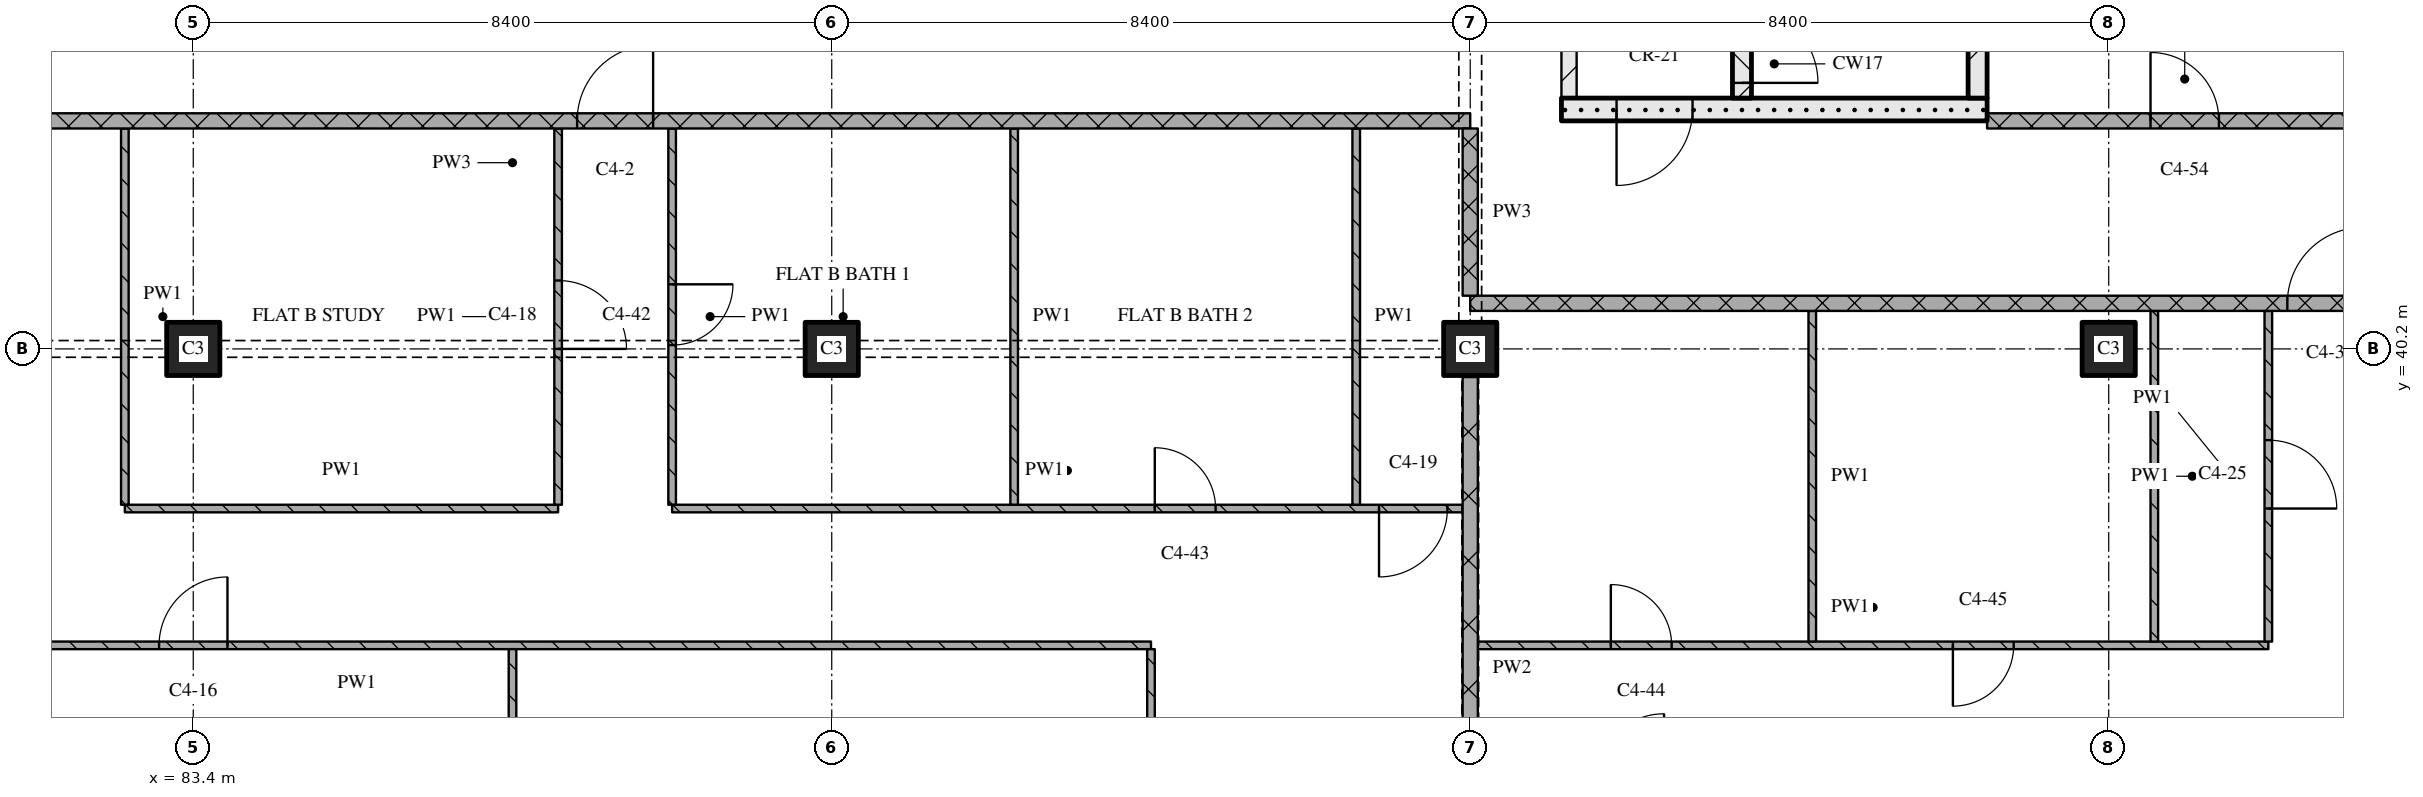
"""IFC4 building model, lengths in metres.
Left out: names, types, materials, properties, quantities, classifications, styles, units other than length and angle.
Written with IfcOpenShell. Run it as: python <this file> out.ifc"""

import sys

from ifc_helpers import new_model, si_unit, direction, frame, frame_2d, origin, origin_2d, place, context, subcontext, project, spatial, rectangle, extrude, element, fill, save


model = new_model("IFC4")
c1 = context("Model", 3, precision=1e-05, world=origin(), true_north=direction((0.0, 1.0)))
c2 = subcontext(c1, "Body", "Model", "MODEL_VIEW")
j1 = project(units=[si_unit("LENGTHUNIT", "METRE"), si_unit("PLANEANGLEUNIT", "RADIAN")], contexts=[c1])
p1 = place(None, origin())
s1 = spatial("IfcSite", under=j1, at=p1, CompositionType="ELEMENT")
p2 = place(p1, origin())
s2 = spatial("IfcBuilding", under=s1, at=p2, CompositionType="ELEMENT")
p3 = place(p2, frame((0.0, 0.0, 179.85)))
s3 = spatial("IfcBuildingStorey", under=s2, at=p3, CompositionType="ELEMENT", Elevation=179.85)
for number, where, z_axis, x_axis in (
    (1, (83.4, 40.2, 0.0), (0.0, 0.0, 1.0), (1.0, 0.0, 0.0)),
    (2, (91.8, 40.2, 0.0), (0.0, 0.0, 1.0), (1.0, 0.0, 0.0)),
    (3, (100.2, 40.2, 0.0), (0.0, 0.0, 1.0), (1.0, 0.0, 0.0)),
    (4, (108.6, 40.2, 0.0), (0.0, 0.0, 1.0), (1.0, 0.0, 0.0)),
):
    element("IfcColumn", number, at=place(p3, frame(where, z_axis=z_axis, x_axis=x_axis)), inside=s3, PredefinedType="COLUMN", context=c2, shape_type="SweptSolid", body=[
        extrude(rectangle(XDim=0.7, YDim=0.7, at=origin_2d()), origin(), (0.0, 0.0, 1.0), 3.6),
    ])
p4 = place(p3, frame((101.4, 43.35, 0.0), z_axis=(0.0, 0.0, 1.0), x_axis=(1.0, 0.0, 0.0)))
e5 = element("IfcWall", 5, at=p4, inside=s3, PredefinedType="SOLIDWALL", context=c2, shape_type="SweptSolid", body=[
    extrude(rectangle(XDim=5.6, YDim=0.3, at=frame_2d((2.8, 0.0))), origin(), (0.0, 0.0, 1.0), 3.32),
])
p5 = place(p4, frame((0.725, 0.0, 0.0)))
e6 = element("IfcOpeningElement", 6, at=p5, cuts=e5, PredefinedType="OPENING", context=c2, shape_type="SweptSolid", body=[
    extrude(rectangle(XDim=1.0, YDim=2.1, at=frame_2d((0.5, 1.05))), frame((0.0, 0.16, 0.0), z_axis=(0.0, -1.0, 0.0), x_axis=(1.0, 0.0, 0.0)), (0.0, 0.0, 1.0), 0.32),
])
p6 = place(p3, frame((101.5, 43.5, 0.0), z_axis=(0.0, 0.0, 1.0), x_axis=(0.0, 1.0, 0.0)))
e7 = element("IfcWall", 7, at=p6, inside=s3, PredefinedType="PARTITIONING", context=c2, shape_type="SweptSolid", body=[
    extrude(rectangle(XDim=6.9, YDim=0.2, at=frame_2d((3.45, 0.0))), origin(), (0.0, 0.0, 1.0), 3.32),
])
p7 = place(p6, frame((1.0, 0.0, 0.0)))
e8 = element("IfcOpeningElement", 8, at=p7, cuts=e7, PredefinedType="OPENING", context=c2, shape_type="SweptSolid", body=[
    extrude(rectangle(XDim=1.0, YDim=2.1, at=frame_2d((0.5, 1.05))), frame((0.0, 0.11, 0.0), z_axis=(0.0, -1.0, 0.0), x_axis=(1.0, 0.0, 0.0)), (0.0, 0.0, 1.0), 0.22),
])
p8 = place(p3, frame((103.775, 43.5, 0.0), z_axis=(0.0, 0.0, 1.0), x_axis=(0.0, 1.0, 0.0)))
e9 = element("IfcWall", 9, at=p8, inside=s3, PredefinedType="SOLIDWALL", context=c2, shape_type="SweptSolid", body=[
    extrude(rectangle(XDim=6.9, YDim=0.25, at=frame_2d((3.45, 0.0))), origin(), (0.0, 0.0, 1.0), 3.32),
])
p9 = place(p8, frame((0.2, 0.0, 0.0)))
e10 = element("IfcOpeningElement", 10, at=p9, cuts=e9, PredefinedType="OPENING", context=c2, shape_type="SweptSolid", body=[
    extrude(rectangle(XDim=1.0, YDim=2.1, at=frame_2d((0.5, 1.05))), frame((0.0, 0.135, 0.0), z_axis=(0.0, -1.0, 0.0), x_axis=(1.0, 0.0, 0.0)), (0.0, 0.0, 1.0), 0.27),
])
p10 = place(p3, frame((106.875, 43.5, 0.0), z_axis=(0.0, 0.0, 1.0), x_axis=(0.0, 1.0, 0.0)))
e11 = element("IfcWall", 11, at=p10, inside=s3, PredefinedType="SOLIDWALL", context=c2, shape_type="SweptSolid", body=[
    extrude(rectangle(XDim=6.9, YDim=0.25, at=frame_2d((3.45, 0.0))), origin(), (0.0, 0.0, 1.0), 3.32),
])
p11 = place(p3, frame((96.0, 36.3, 0.0), z_axis=(0.0, 0.0, 1.0), x_axis=(-1.0, 0.0, 0.0)))
e12 = element("IfcWall", 12, at=p11, inside=s3, PredefinedType="PARTITIONING", context=c2, shape_type="SweptSolid", body=[
    extrude(rectangle(XDim=20.9, YDim=0.1, at=frame_2d((10.45, 0.0))), origin(), (0.0, 0.0, 1.0), 3.32),
])
p12 = place(p11, frame((12.15, 0.0, 0.0)))
e13 = element("IfcOpeningElement", 13, at=p12, cuts=e12, PredefinedType="OPENING", context=c2, shape_type="SweptSolid", body=[
    extrude(rectangle(XDim=0.9, YDim=2.1, at=frame_2d((0.45, 1.05))), frame((0.0, 0.06, 0.0), z_axis=(0.0, -1.0, 0.0), x_axis=(1.0, 0.0, 0.0)), (0.0, 0.0, 1.0), 0.12),
])
p13 = place(p11, frame((18.45, 0.0, 0.0)))
e14 = element("IfcOpeningElement", 14, at=p13, cuts=e12, PredefinedType="OPENING", context=c2, shape_type="SweptSolid", body=[
    extrude(rectangle(XDim=0.9, YDim=2.1, at=frame_2d((0.45, 1.05))), frame((0.0, 0.06, 0.0), z_axis=(0.0, -1.0, 0.0), x_axis=(1.0, 0.0, 0.0)), (0.0, 0.0, 1.0), 0.12),
])
p14 = place(p3, frame((100.3, 36.3, 0.0), z_axis=(0.0, 0.0, 1.0), x_axis=(1.0, 0.0, 0.0)))
e15 = element("IfcWall", 15, at=p14, inside=s3, PredefinedType="PARTITIONING", context=c2, shape_type="SweptSolid", body=[
    extrude(rectangle(XDim=10.4, YDim=0.1, at=frame_2d((5.2, 0.0))), origin(), (0.0, 0.0, 1.0), 3.32),
])
p15 = place(p14, frame((1.75, 0.0, 0.0)))
e16 = element("IfcOpeningElement", 16, at=p15, cuts=e15, PredefinedType="OPENING", context=c2, shape_type="SweptSolid", body=[
    extrude(rectangle(XDim=0.8, YDim=2.1, at=frame_2d((0.4, 1.05))), frame((0.0, 0.06, 0.0), z_axis=(0.0, -1.0, 0.0), x_axis=(1.0, 0.0, 0.0)), (0.0, 0.0, 1.0), 0.12),
])
p16 = place(p14, frame((6.25, 0.0, 0.0)))
e17 = element("IfcOpeningElement", 17, at=p16, cuts=e15, PredefinedType="OPENING", context=c2, shape_type="SweptSolid", body=[
    extrude(rectangle(XDim=0.8, YDim=2.1, at=frame_2d((0.4, 1.05))), frame((0.0, 0.06, 0.0), z_axis=(0.0, -1.0, 0.0), x_axis=(1.0, 0.0, 0.0)), (0.0, 0.0, 1.0), 0.12),
])
p17 = place(p3, frame((82.5, 38.1, 0.0), z_axis=(0.0, 0.0, 1.0), x_axis=(1.0, 0.0, 0.0)))
e18 = element("IfcWall", 18, at=p17, inside=s3, PredefinedType="PARTITIONING", context=c2, shape_type="SweptSolid", body=[
    extrude(rectangle(XDim=5.7, YDim=0.1, at=frame_2d((2.85, 0.0))), origin(), (0.0, 0.0, 1.0), 3.32),
])
p18 = place(p3, frame((89.7, 38.1, 0.0), z_axis=(0.0, 0.0, 1.0), x_axis=(1.0, 0.0, 0.0)))
e19 = element("IfcWall", 19, at=p18, inside=s3, PredefinedType="PARTITIONING", context=c2, shape_type="SweptSolid", body=[
    extrude(rectangle(XDim=10.4, YDim=0.1, at=frame_2d((5.2, 0.0))), origin(), (0.0, 0.0, 1.0), 3.32),
])
p19 = place(p18, frame((6.35, 0.0, 0.0)))
e20 = element("IfcOpeningElement", 20, at=p19, cuts=e19, PredefinedType="OPENING", context=c2, shape_type="SweptSolid", body=[
    extrude(rectangle(XDim=0.8, YDim=2.1, at=frame_2d((0.4, 1.05))), frame((0.0, 0.06, 0.0), z_axis=(0.0, -1.0, 0.0), x_axis=(1.0, 0.0, 0.0)), (0.0, 0.0, 1.0), 0.12),
])
p20 = place(p18, frame((9.3, 0.0, 0.0)))
e21 = element("IfcOpeningElement", 21, at=p20, cuts=e19, PredefinedType="OPENING", context=c2, shape_type="SweptSolid", body=[
    extrude(rectangle(XDim=0.9, YDim=2.1, at=frame_2d((0.45, 1.05))), frame((0.0, 0.06, 0.0), z_axis=(0.0, -1.0, 0.0), x_axis=(1.0, 0.0, 0.0)), (0.0, 0.0, 1.0), 0.12),
])
p21 = place(p3, frame((124.48, 40.8, 0.0), z_axis=(0.0, 0.0, 1.0), x_axis=(-1.0, 0.0, 0.0)))
e22 = element("IfcWall", 22, at=p21, inside=s3, PredefinedType="PARTITIONING", context=c2, shape_type="SweptSolid", body=[
    extrude(rectangle(XDim=24.28, YDim=0.2, at=frame_2d((12.14, 0.0))), origin(), (0.0, 0.0, 1.0), 3.32),
])
p22 = place(p21, frame((12.53, 0.0, 0.0)))
e23 = element("IfcOpeningElement", 23, at=p22, cuts=e22, PredefinedType="OPENING", context=c2, shape_type="SweptSolid", body=[
    extrude(rectangle(XDim=1.0, YDim=2.1, at=frame_2d((0.5, 1.05))), frame((0.0, 0.11, 0.0), z_axis=(0.0, -1.0, 0.0), x_axis=(1.0, 0.0, 0.0)), (0.0, 0.0, 1.0), 0.22),
])
p23 = place(p3, frame((100.2, 43.2, 0.0), z_axis=(0.0, 0.0, 1.0), x_axis=(-1.0, 0.0, 0.0)))
e24 = element("IfcWall", 24, at=p23, inside=s3, PredefinedType="PARTITIONING", context=c2, shape_type="SweptSolid", body=[
    extrude(rectangle(XDim=25.2, YDim=0.2, at=frame_2d((12.6, 0.0))), origin(), (0.0, 0.0, 1.0), 3.32),
])
p24 = place(p23, frame((10.75, 0.0, 0.0)))
e25 = element("IfcOpeningElement", 25, at=p24, cuts=e24, PredefinedType="OPENING", context=c2, shape_type="SweptSolid", body=[
    extrude(rectangle(XDim=1.0, YDim=2.1, at=frame_2d((0.5, 1.05))), frame((0.0, 0.11, 0.0), z_axis=(0.0, -1.0, 0.0), x_axis=(1.0, 0.0, 0.0)), (0.0, 0.0, 1.0), 0.22),
])
p25 = place(p3, frame((107.0, 43.2, 0.0), z_axis=(0.0, 0.0, 1.0), x_axis=(1.0, 0.0, 0.0)))
e26 = element("IfcWall", 26, at=p25, inside=s3, PredefinedType="PARTITIONING", context=c2, shape_type="SweptSolid", body=[
    extrude(rectangle(XDim=5.2, YDim=0.2, at=frame_2d((2.6, 0.0))), origin(), (0.0, 0.0, 1.0), 3.32),
])
p26 = place(p25, frame((2.15, 0.0, 0.0)))
e27 = element("IfcOpeningElement", 27, at=p26, cuts=e26, PredefinedType="OPENING", context=c2, shape_type="SweptSolid", body=[
    extrude(rectangle(XDim=0.9, YDim=2.1, at=frame_2d((0.45, 1.05))), frame((0.0, 0.11, 0.0), z_axis=(0.0, -1.0, 0.0), x_axis=(1.0, 0.0, 0.0)), (0.0, 0.0, 1.0), 0.22),
])
p27 = place(p3, frame((82.5, 43.1, 0.0), z_axis=(0.0, 0.0, 1.0), x_axis=(0.0, -1.0, 0.0)))
e28 = element("IfcWall", 28, at=p27, inside=s3, PredefinedType="PARTITIONING", context=c2, shape_type="SweptSolid", body=[
    extrude(rectangle(XDim=4.95, YDim=0.1, at=frame_2d((2.475, 0.0))), origin(), (0.0, 0.0, 1.0), 3.32),
])
p28 = place(p3, frame((87.6, 36.25, 0.0), z_axis=(0.0, 0.0, 1.0), x_axis=(0.0, -1.0, 0.0)))
e29 = element("IfcWall", 29, at=p28, inside=s3, PredefinedType="PARTITIONING", context=c2, shape_type="SweptSolid", body=[
    extrude(rectangle(XDim=5.97, YDim=0.1, at=frame_2d((2.985, 0.0))), origin(), (0.0, 0.0, 1.0), 3.32),
])
p29 = place(p3, frame((88.2, 38.15, 0.0), z_axis=(0.0, 0.0, 1.0), x_axis=(0.0, 1.0, 0.0)))
e30 = element("IfcWall", 30, at=p29, inside=s3, PredefinedType="PARTITIONING", context=c2, shape_type="SweptSolid", body=[
    extrude(rectangle(XDim=4.95, YDim=0.1, at=frame_2d((2.475, 0.0))), origin(), (0.0, 0.0, 1.0), 3.32),
])
p30 = place(p29, frame((2.05, 0.0, 0.0)))
e31 = element("IfcOpeningElement", 31, at=p30, cuts=e30, PredefinedType="OPENING", context=c2, shape_type="SweptSolid", body=[
    extrude(rectangle(XDim=0.9, YDim=2.1, at=frame_2d((0.45, 1.05))), frame((0.0, 0.06, 0.0), z_axis=(0.0, -1.0, 0.0), x_axis=(1.0, 0.0, 0.0)), (0.0, 0.0, 1.0), 0.12),
])
p31 = place(p3, frame((89.7, 43.1, 0.0), z_axis=(0.0, 0.0, 1.0), x_axis=(0.0, -1.0, 0.0)))
e32 = element("IfcWall", 32, at=p31, inside=s3, PredefinedType="PARTITIONING", context=c2, shape_type="SweptSolid", body=[
    extrude(rectangle(XDim=4.95, YDim=0.1, at=frame_2d((2.475, 0.0))), origin(), (0.0, 0.0, 1.0), 3.32),
])
p32 = place(p31, frame((2.05, 0.0, 0.0)))
e33 = element("IfcOpeningElement", 33, at=p32, cuts=e32, PredefinedType="OPENING", context=c2, shape_type="SweptSolid", body=[
    extrude(rectangle(XDim=0.8, YDim=2.1, at=frame_2d((0.4, 1.05))), frame((0.0, 0.06, 0.0), z_axis=(0.0, -1.0, 0.0), x_axis=(1.0, 0.0, 0.0)), (0.0, 0.0, 1.0), 0.12),
])
p33 = place(p3, frame((94.2, 43.1, 0.0), z_axis=(0.0, 0.0, 1.0), x_axis=(0.0, -1.0, 0.0)))
e34 = element("IfcWall", 34, at=p33, inside=s3, PredefinedType="PARTITIONING", context=c2, shape_type="SweptSolid", body=[
    extrude(rectangle(XDim=4.95, YDim=0.1, at=frame_2d((2.475, 0.0))), origin(), (0.0, 0.0, 1.0), 3.32),
])
p34 = place(p3, frame((96.0, 30.28, 0.0), z_axis=(0.0, 0.0, 1.0), x_axis=(0.0, 1.0, 0.0)))
e35 = element("IfcWall", 35, at=p34, inside=s3, PredefinedType="PARTITIONING", context=c2, shape_type="SweptSolid", body=[
    extrude(rectangle(XDim=5.97, YDim=0.1, at=frame_2d((2.985, 0.0))), origin(), (0.0, 0.0, 1.0), 3.32),
])
p35 = place(p34, frame((2.42, 0.0, 0.0)))
e36 = element("IfcOpeningElement", 36, at=p35, cuts=e35, PredefinedType="OPENING", context=c2, shape_type="SweptSolid", body=[
    extrude(rectangle(XDim=0.9, YDim=2.1, at=frame_2d((0.45, 1.05))), frame((0.0, 0.06, 0.0), z_axis=(0.0, -1.0, 0.0), x_axis=(1.0, 0.0, 0.0)), (0.0, 0.0, 1.0), 0.12),
])
p36 = place(p3, frame((98.7, 43.1, 0.0), z_axis=(0.0, 0.0, 1.0), x_axis=(0.0, -1.0, 0.0)))
e37 = element("IfcWall", 37, at=p36, inside=s3, PredefinedType="PARTITIONING", context=c2, shape_type="SweptSolid", body=[
    extrude(rectangle(XDim=4.95, YDim=0.1, at=frame_2d((2.475, 0.0))), origin(), (0.0, 0.0, 1.0), 3.32),
])
p37 = place(p3, frame((100.2, 43.1, 0.0), z_axis=(0.0, 0.0, 1.0), x_axis=(0.0, -1.0, 0.0)))
e38 = element("IfcWall", 38, at=p37, inside=s3, PredefinedType="PARTITIONING", context=c2, shape_type="SweptSolid", body=[
    extrude(rectangle(XDim=2.2, YDim=0.2, at=frame_2d((1.1, 0.0))), origin(), (0.0, 0.0, 1.0), 2.43),
])
p38 = place(p3, frame((100.2, 39.83, 0.0), z_axis=(0.0, 0.0, 1.0), x_axis=(0.0, -1.0, 0.0)))
e39 = element("IfcWall", 39, at=p38, inside=s3, PredefinedType="PARTITIONING", context=c2, shape_type="SweptSolid", body=[
    extrude(rectangle(XDim=7.66, YDim=0.2, at=frame_2d((3.83, 0.0))), origin(), (0.0, 0.0, 1.0), 2.72),
])
for number, where, z_axis, x_axis in (
    (40, (104.7, 40.7, 0.0), (0.0, 0.0, 1.0), (0.0, -1.0, 0.0)),
    (41, (109.2, 40.7, 0.0), (0.0, 0.0, 1.0), (0.0, -1.0, 0.0)),
):
    element("IfcWall", number, at=place(p3, frame(where, z_axis=z_axis, x_axis=x_axis)), inside=s3, PredefinedType="PARTITIONING", context=c2, shape_type="SweptSolid", body=[
        extrude(rectangle(XDim=4.35, YDim=0.1, at=frame_2d((2.175, 0.0))), origin(), (0.0, 0.0, 1.0), 3.32),
    ])
p39 = place(p3, frame((110.7, 36.35, 0.0), z_axis=(0.0, 0.0, 1.0), x_axis=(0.0, 1.0, 0.0)))
e42 = element("IfcWall", 42, at=p39, inside=s3, PredefinedType="PARTITIONING", context=c2, shape_type="SweptSolid", body=[
    extrude(rectangle(XDim=4.35, YDim=0.1, at=frame_2d((2.175, 0.0))), origin(), (0.0, 0.0, 1.0), 3.32),
])
p40 = place(p39, frame((1.75, 0.0, 0.0)))
e43 = element("IfcOpeningElement", 43, at=p40, cuts=e42, PredefinedType="OPENING", context=c2, shape_type="SweptSolid", body=[
    extrude(rectangle(XDim=0.9, YDim=2.1, at=frame_2d((0.45, 1.05))), frame((0.0, 0.06, 0.0), z_axis=(0.0, -1.0, 0.0), x_axis=(1.0, 0.0, 0.0)), (0.0, 0.0, 1.0), 0.12),
])
p41 = place(p5, origin())
e44 = element("IfcDoor", 44, at=p41, inside=s3, OperationType="SINGLE_SWING_RIGHT", PredefinedType="DOOR", context=c2, shape_type="SweptSolid", body=[
    extrude(rectangle(XDim=1.0, YDim=2.1, at=frame_2d((0.5, 1.05))), frame((0.0, 0.025, 0.0), z_axis=(0.0, -1.0, 0.0), x_axis=(1.0, 0.0, 0.0)), (0.0, 0.0, 1.0), 0.05),
])
fill(e6, e44)
p42 = place(p9, origin())
e45 = element("IfcDoor", 45, at=p42, inside=s3, OperationType="SINGLE_SWING_RIGHT", PredefinedType="DOOR", context=c2, shape_type="SweptSolid", body=[
    extrude(rectangle(XDim=1.0, YDim=2.1, at=frame_2d((0.5, 1.05))), frame((0.0, 0.025, 0.0), z_axis=(0.0, -1.0, 0.0), x_axis=(1.0, 0.0, 0.0)), (0.0, 0.0, 1.0), 0.05),
])
fill(e10, e45)
p43 = place(p12, origin())
e46 = element("IfcDoor", 46, at=p43, inside=s3, OperationType="SINGLE_SWING_RIGHT", PredefinedType="DOOR", context=c2, shape_type="SweptSolid", body=[
    extrude(rectangle(XDim=0.9, YDim=2.1, at=frame_2d((0.45, 1.05))), frame((0.0, 0.025, 0.0), z_axis=(0.0, -1.0, 0.0), x_axis=(1.0, 0.0, 0.0)), (0.0, 0.0, 1.0), 0.05),
])
fill(e13, e46)
p44 = place(p15, origin())
e47 = element("IfcDoor", 47, at=p44, inside=s3, OperationType="SINGLE_SWING_LEFT", PredefinedType="DOOR", context=c2, shape_type="SweptSolid", body=[
    extrude(rectangle(XDim=0.8, YDim=2.1, at=frame_2d((0.4, 1.05))), frame((0.0, 0.025, 0.0), z_axis=(0.0, -1.0, 0.0), x_axis=(1.0, 0.0, 0.0)), (0.0, 0.0, 1.0), 0.05),
])
fill(e16, e47)
p45 = place(p16, origin())
e48 = element("IfcDoor", 48, at=p45, inside=s3, OperationType="SINGLE_SWING_RIGHT", PredefinedType="DOOR", context=c2, shape_type="SweptSolid", body=[
    extrude(rectangle(XDim=0.8, YDim=2.1, at=frame_2d((0.4, 1.05))), frame((0.0, 0.025, 0.0), z_axis=(0.0, -1.0, 0.0), x_axis=(1.0, 0.0, 0.0)), (0.0, 0.0, 1.0), 0.05),
])
fill(e17, e48)
p46 = place(p19, origin())
e49 = element("IfcDoor", 49, at=p46, inside=s3, OperationType="SINGLE_SWING_LEFT", PredefinedType="DOOR", context=c2, shape_type="SweptSolid", body=[
    extrude(rectangle(XDim=0.8, YDim=2.1, at=frame_2d((0.4, 1.05))), frame((0.0, 0.025, 0.0), z_axis=(0.0, -1.0, 0.0), x_axis=(1.0, 0.0, 0.0)), (0.0, 0.0, 1.0), 0.05),
])
fill(e20, e49)
p47 = place(p20, origin())
e50 = element("IfcDoor", 50, at=p47, inside=s3, OperationType="SINGLE_SWING_RIGHT", PredefinedType="DOOR", context=c2, shape_type="SweptSolid", body=[
    extrude(rectangle(XDim=0.9, YDim=2.1, at=frame_2d((0.45, 1.05))), frame((0.0, 0.025, 0.0), z_axis=(0.0, -1.0, 0.0), x_axis=(1.0, 0.0, 0.0)), (0.0, 0.0, 1.0), 0.05),
])
fill(e21, e50)
p48 = place(p22, origin())
e51 = element("IfcDoor", 51, at=p48, inside=s3, OperationType="SINGLE_SWING_RIGHT", PredefinedType="DOOR", context=c2, shape_type="SweptSolid", body=[
    extrude(rectangle(XDim=1.0, YDim=2.1, at=frame_2d((0.5, 1.05))), frame((0.0, 0.025, 0.0), z_axis=(0.0, -1.0, 0.0), x_axis=(1.0, 0.0, 0.0)), (0.0, 0.0, 1.0), 0.05),
])
fill(e23, e51)
p49 = place(p24, origin())
e52 = element("IfcDoor", 52, at=p49, inside=s3, OperationType="SINGLE_SWING_RIGHT", PredefinedType="DOOR", context=c2, shape_type="SweptSolid", body=[
    extrude(rectangle(XDim=1.0, YDim=2.1, at=frame_2d((0.5, 1.05))), frame((0.0, 0.025, 0.0), z_axis=(0.0, -1.0, 0.0), x_axis=(1.0, 0.0, 0.0)), (0.0, 0.0, 1.0), 0.05),
])
fill(e25, e52)
p50 = place(p26, origin())
e53 = element("IfcDoor", 53, at=p50, inside=s3, OperationType="SINGLE_SWING_LEFT", PredefinedType="DOOR", context=c2, shape_type="SweptSolid", body=[
    extrude(rectangle(XDim=0.9, YDim=2.1, at=frame_2d((0.45, 1.05))), frame((0.0, 0.025, 0.0), z_axis=(0.0, -1.0, 0.0), x_axis=(1.0, 0.0, 0.0)), (0.0, 0.0, 1.0), 0.05),
])
fill(e27, e53)
p51 = place(p30, origin())
e54 = element("IfcDoor", 54, at=p51, inside=s3, OperationType="SINGLE_SWING_RIGHT", PredefinedType="DOOR", context=c2, shape_type="SweptSolid", body=[
    extrude(rectangle(XDim=0.9, YDim=2.1, at=frame_2d((0.45, 1.05))), frame((0.0, 0.025, 0.0), z_axis=(0.0, -1.0, 0.0), x_axis=(1.0, 0.0, 0.0)), (0.0, 0.0, 1.0), 0.05),
])
fill(e31, e54)
p52 = place(p32, origin())
e55 = element("IfcDoor", 55, at=p52, inside=s3, OperationType="SINGLE_SWING_LEFT", PredefinedType="DOOR", context=c2, shape_type="SweptSolid", body=[
    extrude(rectangle(XDim=0.8, YDim=2.1, at=frame_2d((0.4, 1.05))), frame((0.0, 0.025, 0.0), z_axis=(0.0, -1.0, 0.0), x_axis=(1.0, 0.0, 0.0)), (0.0, 0.0, 1.0), 0.05),
])
fill(e33, e55)
p53 = place(p40, origin())
e56 = element("IfcDoor", 56, at=p53, inside=s3, OperationType="SINGLE_SWING_RIGHT", PredefinedType="DOOR", context=c2, shape_type="SweptSolid", body=[
    extrude(rectangle(XDim=0.9, YDim=2.1, at=frame_2d((0.45, 1.05))), frame((0.0, 0.025, 0.0), z_axis=(0.0, -1.0, 0.0), x_axis=(1.0, 0.0, 0.0)), (0.0, 0.0, 1.0), 0.05),
])
fill(e43, e56)
save(model, sys.argv[1])
